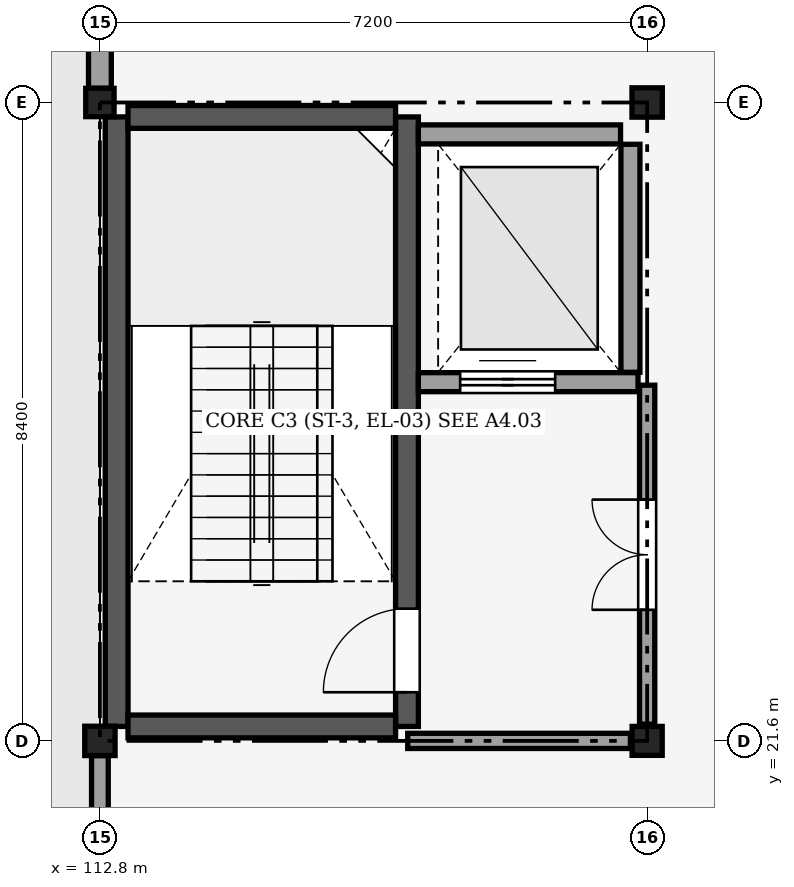
"""IFC4 building model, lengths in metres.
Left out: names, types, materials, properties, quantities, classifications, styles, units other than length and angle.
Written with IfcOpenShell. Run it as: python <this file> out.ifc"""

import sys

from ifc_helpers import new_model, si_unit, direction, frame, frame_2d, origin, origin_2d, place, context, subcontext, project, spatial, rectangle, i_section, extrude, element, fill, save


model = new_model("IFC4")
c1 = context("Model", 3, precision=1e-05, world=origin(), true_north=direction((0.0, 1.0)))
c2 = subcontext(c1, "Body", "Model", "MODEL_VIEW")
j1 = project(units=[si_unit("LENGTHUNIT", "METRE"), si_unit("PLANEANGLEUNIT", "RADIAN")], contexts=[c1])
p1 = place(None, origin())
s1 = spatial("IfcSite", under=j1, at=p1, CompositionType="ELEMENT")
p2 = place(p1, origin())
s2 = spatial("IfcBuilding", under=s1, at=p2, CompositionType="ELEMENT")
p3 = place(p2, frame((0.0, 0.0, 5.4)))
s3 = spatial("IfcBuildingStorey", under=s2, at=p3, CompositionType="ELEMENT", Elevation=5.4)
p4 = place(p3, frame((112.8, 21.6, 0.0), z_axis=(0.0, 0.0, 1.0), x_axis=(1.0, 0.0, 0.0)))
e1 = element("IfcColumn", 1, at=p4, inside=s3, PredefinedType="COLUMN", context=c2, shape_type="SweptSolid", body=[
    extrude(i_section(OverallWidth=0.399, OverallDepth=0.386, WebThickness=0.021, FlangeThickness=0.033, FilletRadius=0.025, at=origin_2d()), origin(), (0.0, 0.0, 1.0), 4.8),
])
p5 = place(p3, frame((112.8, 30.0, 0.0), z_axis=(0.0, 0.0, 1.0), x_axis=(1.0, 0.0, 0.0)))
e2 = element("IfcColumn", 2, at=p5, inside=s3, PredefinedType="COLUMN", context=c2, shape_type="SweptSolid", body=[
    extrude(i_section(OverallWidth=0.373, OverallDepth=0.373, WebThickness=0.016, FlangeThickness=0.026, FilletRadius=0.025, at=origin_2d()), origin(), (0.0, 0.0, 1.0), 4.8),
])
p6 = place(p3, frame((120.0, 21.6, 0.0), z_axis=(0.0, 0.0, 1.0), x_axis=(1.0, 0.0, 0.0)))
e3 = element("IfcColumn", 3, at=p6, inside=s3, PredefinedType="COLUMN", context=c2, shape_type="SweptSolid", body=[
    extrude(i_section(OverallWidth=0.396, OverallDepth=0.381, WebThickness=0.019, FlangeThickness=0.03, FilletRadius=0.025, at=origin_2d()), origin(), (0.0, 0.0, 1.0), 4.8),
])
p7 = place(p3, frame((120.0, 30.0, 0.0), z_axis=(0.0, 0.0, 1.0), x_axis=(1.0, 0.0, 0.0)))
e4 = element("IfcColumn", 4, at=p7, inside=s3, PredefinedType="COLUMN", context=c2, shape_type="SweptSolid", body=[
    extrude(i_section(OverallWidth=0.399, OverallDepth=0.386, WebThickness=0.021, FlangeThickness=0.033, FilletRadius=0.025, at=origin_2d()), origin(), (0.0, 0.0, 1.0), 4.8),
])
p8 = place(p3, frame((112.8, 14.584, 0.0), z_axis=(0.0, 0.0, 1.0), x_axis=(0.0, 1.0, 0.0)))
e5 = element("IfcWall", 5, at=p8, inside=s3, PredefinedType="SOLIDWALL", context=c2, shape_type="SweptSolid", body=[
    extrude(rectangle(XDim=6.823, YDim=0.22, at=frame_2d((3.412, 0.0))), origin(), (0.0, 0.0, 1.0), 4.058),
])
p9 = place(p8, frame((0.75, 0.0, 0.9)))
e6 = element("IfcOpeningElement", 6, at=p9, cuts=e5, PredefinedType="OPENING", context=c2, shape_type="SweptSolid", body=[
    extrude(rectangle(XDim=1.2, YDim=1.5, at=frame_2d((0.6, 0.75))), frame((0.0, 0.12, 0.0), z_axis=(0.0, -1.0, 0.0), x_axis=(1.0, 0.0, 0.0)), (0.0, 0.0, 1.0), 0.24),
])
p10 = place(p3, frame((112.8, 30.187, 0.0), z_axis=(0.0, 0.0, 1.0), x_axis=(0.0, 1.0, 0.0)))
e7 = element("IfcWall", 7, at=p10, inside=s3, PredefinedType="SOLIDWALL", context=c2, shape_type="SweptSolid", body=[
    extrude(rectangle(XDim=8.025, YDim=0.3, at=frame_2d((4.013, 0.0))), origin(), (0.0, 0.0, 1.0), 3.664),
])
p11 = place(p10, frame((0.75, 0.0, 0.9)))
e8 = element("IfcOpeningElement", 8, at=p11, cuts=e7, PredefinedType="OPENING", context=c2, shape_type="SweptSolid", body=[
    extrude(rectangle(XDim=1.2, YDim=1.5, at=frame_2d((0.6, 0.75))), frame((0.0, 0.16, 0.0), z_axis=(0.0, -1.0, 0.0), x_axis=(1.0, 0.0, 0.0)), (0.0, 0.0, 1.0), 0.321),
])
p12 = place(p3, frame((113.02, 21.79, 0.0), z_axis=(0.0, 0.0, 1.0), x_axis=(0.0, 1.0, 0.0)))
e9 = element("IfcWall", 9, at=p12, inside=s3, PredefinedType="SHEAR", context=c2, shape_type="SweptSolid", body=[
    extrude(rectangle(XDim=8.02, YDim=0.3, at=frame_2d((4.01, 0.0))), origin(), (0.0, 0.0, 1.0), 4.54),
])
p13 = place(p3, frame((116.84, 21.79, 0.0), z_axis=(0.0, 0.0, 1.0), x_axis=(0.0, 1.0, 0.0)))
e10 = element("IfcWall", 10, at=p13, inside=s3, PredefinedType="SHEAR", context=c2, shape_type="SweptSolid", body=[
    extrude(rectangle(XDim=8.02, YDim=0.3, at=frame_2d((4.01, 0.0))), origin(), (0.0, 0.0, 1.0), 4.54),
])
p14 = place(p13, frame((0.45, 0.0, 0.0)))
e11 = element("IfcOpeningElement", 11, at=p14, cuts=e10, PredefinedType="OPENING", context=c2, shape_type="SweptSolid", body=[
    extrude(rectangle(XDim=1.1, YDim=2.15, at=frame_2d((0.55, 1.075))), frame((0.0, 0.16, 0.0), z_axis=(0.0, -1.0, 0.0), x_axis=(1.0, 0.0, 0.0)), (0.0, 0.0, 1.0), 0.321),
])
for number, where, z_axis, x_axis in (
    (12, (113.17, 21.79, 0.0), (0.0, 0.0, 1.0), (1.0, 0.0, 0.0)),
    (13, (113.17, 29.81, 0.0), (0.0, 0.0, 1.0), (1.0, 0.0, 0.0)),
):
    element("IfcWall", number, at=place(p3, frame(where, z_axis=z_axis, x_axis=x_axis)), inside=s3, PredefinedType="SHEAR", context=c2, shape_type="SweptSolid", body=[
        extrude(rectangle(XDim=3.52, YDim=0.3, at=frame_2d((1.76, 0.0))), origin(), (0.0, 0.0, 1.0), 4.54),
    ])
p15 = place(p3, frame((116.99, 29.58, 0.0), z_axis=(0.0, 0.0, 1.0), x_axis=(1.0, 0.0, 0.0)))
e14 = element("IfcWall", 14, at=p15, inside=s3, PredefinedType="PARTITIONING", context=c2, shape_type="SweptSolid", body=[
    extrude(rectangle(XDim=2.66, YDim=0.25, at=frame_2d((1.33, 0.0))), origin(), (0.0, 0.0, 1.0), 4.54),
])
p16 = place(p3, frame((119.78, 26.45, 0.0), z_axis=(0.0, 0.0, 1.0), x_axis=(0.0, 1.0, 0.0)))
e15 = element("IfcWall", 15, at=p16, inside=s3, PredefinedType="PARTITIONING", context=c2, shape_type="SweptSolid", body=[
    extrude(rectangle(XDim=3.0, YDim=0.25, at=frame_2d((1.5, 0.0))), origin(), (0.0, 0.0, 1.0), 3.664),
])
p17 = place(p3, frame((116.99, 26.32, 0.0), z_axis=(0.0, 0.0, 1.0), x_axis=(1.0, 0.0, 0.0)))
e16 = element("IfcWall", 16, at=p17, inside=s3, PredefinedType="PARTITIONING", context=c2, shape_type="SweptSolid", body=[
    extrude(rectangle(XDim=2.89, YDim=0.25, at=frame_2d((1.445, 0.0))), origin(), (0.0, 0.0, 1.0), 4.54),
])
p18 = place(p17, frame((0.55, 0.0, 0.0)))
e17 = element("IfcOpeningElement", 17, at=p18, cuts=e16, PredefinedType="OPENING", context=c2, shape_type="SweptSolid", body=[
    extrude(rectangle(XDim=1.25, YDim=2.15, at=frame_2d((0.625, 1.075))), frame((0.0, 0.135, 0.0), z_axis=(0.0, -1.0, 0.0), x_axis=(1.0, 0.0, 0.0)), (0.0, 0.0, 1.0), 0.271),
])
p19 = place(p3, frame((116.85, 21.6, 0.0), z_axis=(0.0, 0.0, 1.0), x_axis=(1.0, 0.0, 0.0)))
e18 = element("IfcWall", 18, at=p19, inside=s3, PredefinedType="PARTITIONING", context=c2, shape_type="SweptSolid", body=[
    extrude(rectangle(XDim=2.93, YDim=0.2, at=frame_2d((1.465, 0.0))), origin(), (0.0, 0.0, 1.0), 3.913),
])
p20 = place(p3, frame((120.0, 21.82, 0.0), z_axis=(0.0, 0.0, 1.0), x_axis=(0.0, 1.0, 0.0)))
e19 = element("IfcWall", 19, at=p20, inside=s3, PredefinedType="PARTITIONING", context=c2, shape_type="SweptSolid", body=[
    extrude(rectangle(XDim=4.46, YDim=0.2, at=frame_2d((2.23, 0.0))), origin(), (0.0, 0.0, 1.0), 3.664),
])
p21 = place(p20, frame((1.505, 0.0, 0.0)))
e20 = element("IfcOpeningElement", 20, at=p21, cuts=e19, PredefinedType="OPENING", context=c2, shape_type="SweptSolid", body=[
    extrude(rectangle(XDim=1.45, YDim=2.2, at=frame_2d((0.725, 1.1))), frame((0.0, 0.11, 0.0), z_axis=(0.0, -1.0, 0.0), x_axis=(1.0, 0.0, 0.0)), (0.0, 0.0, 1.0), 0.22),
])
p22 = place(p14, origin())
e21 = element("IfcDoor", 21, at=p22, inside=s3, OperationType="SINGLE_SWING_LEFT", PredefinedType="DOOR", context=c2, shape_type="SweptSolid", body=[
    extrude(rectangle(XDim=1.1, YDim=2.15, at=frame_2d((0.55, 1.075))), frame((0.0, 0.025, 0.0), z_axis=(0.0, -1.0, 0.0), x_axis=(1.0, 0.0, 0.0)), (0.0, 0.0, 1.0), 0.05),
])
fill(e11, e21)
p23 = place(p18, origin())
e22 = element("IfcDoor", 22, at=p23, inside=s3, OperationType="DOUBLE_DOOR_SLIDING", PredefinedType="DOOR", context=c2, shape_type="SweptSolid", body=[
    extrude(rectangle(XDim=1.25, YDim=2.15, at=frame_2d((0.625, 1.075))), frame((0.0, 0.025, 0.0), z_axis=(0.0, -1.0, 0.0), x_axis=(1.0, 0.0, 0.0)), (0.0, 0.0, 1.0), 0.05),
])
fill(e17, e22)
p24 = place(p21, origin())
e23 = element("IfcDoor", 23, at=p24, inside=s3, OperationType="DOUBLE_DOOR_SINGLE_SWING", PredefinedType="DOOR", context=c2, shape_type="SweptSolid", body=[
    extrude(rectangle(XDim=1.45, YDim=2.2, at=frame_2d((0.725, 1.1))), frame((0.0, 0.025, 0.0), z_axis=(0.0, -1.0, 0.0), x_axis=(1.0, 0.0, 0.0)), (0.0, 0.0, 1.0), 0.05),
])
fill(e20, e23)
save(model, sys.argv[1])
